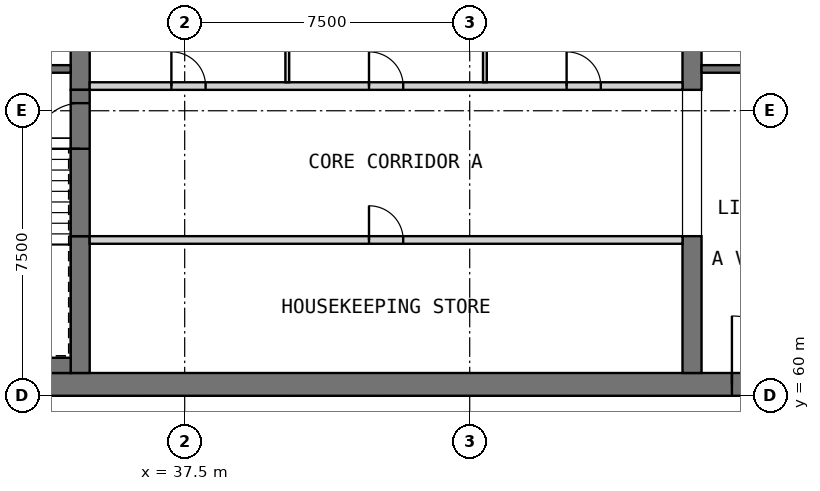
"""IFC4 building model, lengths in metres.
Left out: names, types, materials, properties, quantities, classifications, styles, units other than length and angle.
Written with IfcOpenShell. Run it as: python <this file> out.ifc"""

import sys

from ifc_helpers import new_model, si_unit, direction, frame, frame_2d, origin, place, context, subcontext, project, spatial, rectangle, extrude, element, fill, save


model = new_model("IFC4")
c1 = context("Model", 3, precision=1e-05, world=origin(), true_north=direction((0.0, 1.0)))
c2 = subcontext(c1, "Body", "Model", "MODEL_VIEW")
j1 = project(units=[si_unit("LENGTHUNIT", "METRE"), si_unit("PLANEANGLEUNIT", "RADIAN")], contexts=[c1])
p1 = place(None, origin())
s1 = spatial("IfcSite", under=j1, at=p1, CompositionType="ELEMENT")
p2 = place(p1, origin())
s2 = spatial("IfcBuilding", under=s1, at=p2, CompositionType="ELEMENT")
p3 = place(p2, frame((0.0, 0.0, 254.7)))
s3 = spatial("IfcBuildingStorey", under=s2, at=p3, CompositionType="ELEMENT", Elevation=254.7)
p4 = place(p3, frame((30.0, 60.3, 0.0), z_axis=(0.0, 0.0, 1.0), x_axis=(1.0, 0.0, 0.0)))
e1 = element("IfcWall", 1, at=p4, inside=s3, PredefinedType="SHEAR", context=c2, shape_type="SweptSolid", body=[
    extrude(rectangle(XDim=30.0, YDim=0.6, at=frame_2d((15.0, 0.0))), origin(), (0.0, 0.0, 1.0), 3.5),
])
p5 = place(p4, frame((21.9, 0.0, 0.0)))
e2 = element("IfcOpeningElement", 2, at=p5, cuts=e1, PredefinedType="OPENING", context=c2, shape_type="SweptSolid", body=[
    extrude(rectangle(XDim=1.8, YDim=2.1, at=frame_2d((0.9, 1.05))), frame((0.0, 0.31, 0.0), z_axis=(0.0, -1.0, 0.0), x_axis=(1.0, 0.0, 0.0)), (0.0, 0.0, 1.0), 0.62),
])
p6 = place(p4, frame((26.5, 0.0, 0.0)))
e3 = element("IfcOpeningElement", 3, at=p6, cuts=e1, PredefinedType="OPENING", context=c2, shape_type="SweptSolid", body=[
    extrude(rectangle(XDim=1.2, YDim=2.1, at=frame_2d((0.6, 1.05))), frame((0.0, 0.31, 0.0), z_axis=(0.0, -1.0, 0.0), x_axis=(1.0, 0.0, 0.0)), (0.0, 0.0, 1.0), 0.62),
])
p7 = place(p3, frame((34.75, 60.6, 0.0), z_axis=(0.0, 0.0, 1.0), x_axis=(0.0, 1.0, 0.0)))
e4 = element("IfcWall", 4, at=p7, inside=s3, PredefinedType="SHEAR", context=c2, shape_type="SweptSolid", body=[
    extrude(rectangle(XDim=3.6, YDim=0.5, at=frame_2d((1.8, 0.0))), origin(), (0.0, 0.0, 1.0), 3.5),
])
p8 = place(p3, frame((34.75, 68.05, 0.0), z_axis=(0.0, 0.0, 1.0), x_axis=(0.0, 1.0, 0.0)))
e5 = element("IfcWall", 5, at=p8, inside=s3, PredefinedType="SHEAR", context=c2, shape_type="SweptSolid", body=[
    extrude(rectangle(XDim=6.4, YDim=0.5, at=frame_2d((3.2, 0.0))), origin(), (0.0, 0.0, 1.0), 3.5),
])
p9 = place(p3, frame((50.85, 60.6, 0.0), z_axis=(0.0, 0.0, 1.0), x_axis=(0.0, 1.0, 0.0)))
e6 = element("IfcWall", 6, at=p9, inside=s3, PredefinedType="SHEAR", context=c2, shape_type="SweptSolid", body=[
    extrude(rectangle(XDim=3.6, YDim=0.5, at=frame_2d((1.8, 0.0))), origin(), (0.0, 0.0, 1.0), 3.5),
])
p10 = place(p3, frame((50.85, 68.05, 0.0), z_axis=(0.0, 0.0, 1.0), x_axis=(0.0, 1.0, 0.0)))
e7 = element("IfcWall", 7, at=p10, inside=s3, PredefinedType="SHEAR", context=c2, shape_type="SweptSolid", body=[
    extrude(rectangle(XDim=6.4, YDim=0.5, at=frame_2d((3.2, 0.0))), origin(), (0.0, 0.0, 1.0), 3.5),
])
p11 = place(p3, frame((35.0, 64.1, 0.0), z_axis=(0.0, 0.0, 1.0), x_axis=(1.0, 0.0, 0.0)))
e8 = element("IfcWall", 8, at=p11, inside=s3, PredefinedType="PARTITIONING", context=c2, shape_type="SweptSolid", body=[
    extrude(rectangle(XDim=15.6, YDim=0.2, at=frame_2d((7.8, 0.0))), origin(), (0.0, 0.0, 1.0), 3.09),
])
p12 = place(p11, frame((7.35, 0.0, 0.0)))
e9 = element("IfcOpeningElement", 9, at=p12, cuts=e8, PredefinedType="OPENING", context=c2, shape_type="SweptSolid", body=[
    extrude(rectangle(XDim=0.9, YDim=2.1, at=frame_2d((0.45, 1.05))), frame((0.0, 0.11, 0.0), z_axis=(0.0, -1.0, 0.0), x_axis=(1.0, 0.0, 0.0)), (0.0, 0.0, 1.0), 0.22),
])
p13 = place(p3, frame((35.0, 68.15, 0.0), z_axis=(0.0, 0.0, 1.0), x_axis=(1.0, 0.0, 0.0)))
e10 = element("IfcWall", 10, at=p13, inside=s3, PredefinedType="PARTITIONING", context=c2, shape_type="SweptSolid", body=[
    extrude(rectangle(XDim=15.6, YDim=0.2, at=frame_2d((7.8, 0.0))), origin(), (0.0, 0.0, 1.0), 3.09),
])
p14 = place(p13, frame((2.15, 0.0, 0.0)))
e11 = element("IfcOpeningElement", 11, at=p14, cuts=e10, PredefinedType="OPENING", context=c2, shape_type="SweptSolid", body=[
    extrude(rectangle(XDim=0.9, YDim=2.1, at=frame_2d((0.45, 1.05))), frame((0.0, 0.11, 0.0), z_axis=(0.0, -1.0, 0.0), x_axis=(1.0, 0.0, 0.0)), (0.0, 0.0, 1.0), 0.22),
])
p15 = place(p13, frame((7.35, 0.0, 0.0)))
e12 = element("IfcOpeningElement", 12, at=p15, cuts=e10, PredefinedType="OPENING", context=c2, shape_type="SweptSolid", body=[
    extrude(rectangle(XDim=0.9, YDim=2.1, at=frame_2d((0.45, 1.05))), frame((0.0, 0.11, 0.0), z_axis=(0.0, -1.0, 0.0), x_axis=(1.0, 0.0, 0.0)), (0.0, 0.0, 1.0), 0.22),
])
p16 = place(p13, frame((12.55, 0.0, 0.0)))
e13 = element("IfcOpeningElement", 13, at=p16, cuts=e10, PredefinedType="OPENING", context=c2, shape_type="SweptSolid", body=[
    extrude(rectangle(XDim=0.9, YDim=2.1, at=frame_2d((0.45, 1.05))), frame((0.0, 0.11, 0.0), z_axis=(0.0, -1.0, 0.0), x_axis=(1.0, 0.0, 0.0)), (0.0, 0.0, 1.0), 0.22),
])
for number, where, z_axis, x_axis in (
    (14, (40.2, 68.25, 0.0), (0.0, 0.0, 1.0), (0.0, 1.0, 0.0)),
    (15, (45.4, 68.25, 0.0), (0.0, 0.0, 1.0), (0.0, 1.0, 0.0)),
):
    element("IfcWall", number, at=place(p3, frame(where, z_axis=z_axis, x_axis=x_axis)), inside=s3, PredefinedType="PARTITIONING", context=c2, shape_type="SweptSolid", body=[
        extrude(rectangle(XDim=2.75, YDim=0.1, at=frame_2d((1.375, 0.0))), origin(), (0.0, 0.0, 1.0), 3.09),
    ])
p17 = place(p3, frame((34.75, 64.2, 0.0), z_axis=(0.0, 0.0, 1.0), x_axis=(0.0, 1.0, 0.0)))
e16 = element("IfcWall", 16, at=p17, inside=s3, PredefinedType="SOLIDWALL", context=c2, shape_type="SweptSolid", body=[
    extrude(rectangle(XDim=3.85, YDim=0.5, at=frame_2d((1.925, 0.0))), origin(), (0.0, 0.0, 1.0), 2.3),
])
p18 = place(p17, frame((2.3, 0.0, 0.0)))
e17 = element("IfcOpeningElement", 17, at=p18, cuts=e16, PredefinedType="OPENING", context=c2, shape_type="SweptSolid", body=[
    extrude(rectangle(XDim=1.2, YDim=2.1, at=frame_2d((0.6, 1.05))), frame((0.0, 0.26, 0.0), z_axis=(0.0, -1.0, 0.0), x_axis=(1.0, 0.0, 0.0)), (0.0, 0.0, 1.0), 0.52),
])
p19 = place(p3, frame((30.6, 68.6, 0.0), z_axis=(0.0, 0.0, 1.0), x_axis=(1.0, 0.0, 0.0)))
e18 = element("IfcWall", 18, at=p19, inside=s3, PredefinedType="SOLIDWALL", context=c2, shape_type="SweptSolid", body=[
    extrude(rectangle(XDim=3.9, YDim=0.2, at=frame_2d((1.95, 0.0))), origin(), (0.0, 0.0, 1.0), 3.09),
])
p20 = place(p19, frame((1.7, 0.0, 0.0)))
e19 = element("IfcOpeningElement", 19, at=p20, cuts=e18, PredefinedType="OPENING", context=c2, shape_type="SweptSolid", body=[
    extrude(rectangle(XDim=0.9, YDim=2.1, at=frame_2d((0.45, 1.05))), frame((0.0, 0.11, 0.0), z_axis=(0.0, -1.0, 0.0), x_axis=(1.0, 0.0, 0.0)), (0.0, 0.0, 1.0), 0.22),
])
p21 = place(p3, frame((51.1, 68.6, 0.0), z_axis=(0.0, 0.0, 1.0), x_axis=(1.0, 0.0, 0.0)))
e20 = element("IfcWall", 20, at=p21, inside=s3, PredefinedType="SOLIDWALL", context=c2, shape_type="SweptSolid", body=[
    extrude(rectangle(XDim=8.3, YDim=0.2, at=frame_2d((4.15, 0.0))), origin(), (0.0, 0.0, 1.0), 3.09),
])
p22 = place(p3, frame((31.0, 60.8, 0.0), z_axis=(0.0, 0.0, 1.0), x_axis=(1.0, 0.0, 0.0)))
e21 = element("IfcWall", 21, at=p22, inside=s3, PredefinedType="SOLIDWALL", context=c2, shape_type="SweptSolid", body=[
    extrude(rectangle(XDim=3.5, YDim=0.4, at=frame_2d((1.75, 0.0))), origin(), (0.0, 0.0, 1.0), 3.09),
])
p23 = place(p12, origin())
e22 = element("IfcDoor", 22, at=p23, inside=s3, OperationType="SINGLE_SWING_RIGHT", PredefinedType="DOOR", context=c2, shape_type="SweptSolid", body=[
    extrude(rectangle(XDim=0.9, YDim=2.1, at=frame_2d((0.45, 1.05))), frame((0.0, 0.025, 0.0), z_axis=(0.0, -1.0, 0.0), x_axis=(1.0, 0.0, 0.0)), (0.0, 0.0, 1.0), 0.05),
])
fill(e9, e22)
p24 = place(p14, origin())
e23 = element("IfcDoor", 23, at=p24, inside=s3, OperationType="SINGLE_SWING_RIGHT", PredefinedType="DOOR", context=c2, shape_type="SweptSolid", body=[
    extrude(rectangle(XDim=0.9, YDim=2.1, at=frame_2d((0.45, 1.05))), frame((0.0, 0.025, 0.0), z_axis=(0.0, -1.0, 0.0), x_axis=(1.0, 0.0, 0.0)), (0.0, 0.0, 1.0), 0.05),
])
fill(e11, e23)
p25 = place(p15, origin())
e24 = element("IfcDoor", 24, at=p25, inside=s3, OperationType="SINGLE_SWING_LEFT", PredefinedType="DOOR", context=c2, shape_type="SweptSolid", body=[
    extrude(rectangle(XDim=0.9, YDim=2.1, at=frame_2d((0.45, 1.05))), frame((0.0, 0.025, 0.0), z_axis=(0.0, -1.0, 0.0), x_axis=(1.0, 0.0, 0.0)), (0.0, 0.0, 1.0), 0.05),
])
fill(e12, e24)
p26 = place(p16, origin())
e25 = element("IfcDoor", 25, at=p26, inside=s3, OperationType="SINGLE_SWING_RIGHT", PredefinedType="DOOR", context=c2, shape_type="SweptSolid", body=[
    extrude(rectangle(XDim=0.9, YDim=2.1, at=frame_2d((0.45, 1.05))), frame((0.0, 0.025, 0.0), z_axis=(0.0, -1.0, 0.0), x_axis=(1.0, 0.0, 0.0)), (0.0, 0.0, 1.0), 0.05),
])
fill(e13, e25)
p27 = place(p5, origin())
e26 = element("IfcDoor", 26, at=p27, inside=s3, OperationType="DOUBLE_DOOR_SINGLE_SWING", PredefinedType="DOOR", context=c2, shape_type="SweptSolid", body=[
    extrude(rectangle(XDim=1.8, YDim=2.1, at=frame_2d((0.9, 1.05))), frame((0.0, 0.025, 0.0), z_axis=(0.0, -1.0, 0.0), x_axis=(1.0, 0.0, 0.0)), (0.0, 0.0, 1.0), 0.05),
])
fill(e2, e26)
p28 = place(p18, origin())
e27 = element("IfcDoor", 27, at=p28, inside=s3, OperationType="SINGLE_SWING_LEFT", PredefinedType="DOOR", context=c2, shape_type="SweptSolid", body=[
    extrude(rectangle(XDim=1.2, YDim=2.1, at=frame_2d((0.6, 1.05))), frame((0.0, 0.025, 0.0), z_axis=(0.0, -1.0, 0.0), x_axis=(1.0, 0.0, 0.0)), (0.0, 0.0, 1.0), 0.05),
])
fill(e17, e27)
save(model, sys.argv[1])
